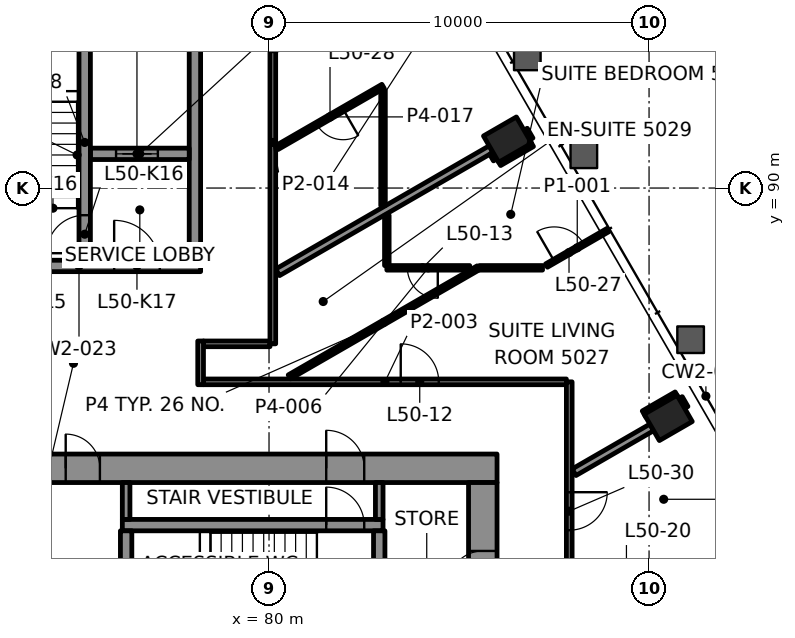
"""IFC4 building model, lengths in metres.
Left out: names, types, materials, properties, quantities, classifications, styles, units other than length and angle.
Written with IfcOpenShell. Run it as: python <this file> out.ifc"""

import sys

from ifc_helpers import new_model, si_unit, direction, frame, frame_2d, origin, origin_2d, place, context, subcontext, project, spatial, rectangle, hollow_rectangle, extrude, element, fill, save


model = new_model("IFC4")
c1 = context("Model", 3, precision=1e-05, world=origin(), true_north=direction((0.0, 1.0)))
c2 = subcontext(c1, "Body", "Model", "MODEL_VIEW")
j1 = project(units=[si_unit("LENGTHUNIT", "METRE"), si_unit("PLANEANGLEUNIT", "RADIAN")], contexts=[c1])
p1 = place(None, origin())
s1 = spatial("IfcSite", under=j1, at=p1, CompositionType="ELEMENT")
p2 = place(p1, origin())
s2 = spatial("IfcBuilding", under=s1, at=p2, CompositionType="ELEMENT")
p3 = place(p2, frame((0.0, 0.0, 214.3)))
s3 = spatial("IfcBuildingStorey", under=s2, at=p3, CompositionType="ELEMENT", Elevation=214.3)
for number, where, z_axis, x_axis in (
    (1, (90.504, 83.951, -0.0), (0.0, 0.0, 1.0), (-0.5, 0.866, 0.0)),
    (2, (86.276, 91.274, -0.0), (0.0, 0.0, 1.0), (-0.5, 0.866, 0.0)),
):
    element("IfcColumn", number, at=place(p3, frame(where, z_axis=z_axis, x_axis=x_axis)), inside=s3, PredefinedType="COLUMN", context=c2, shape_type="SweptSolid", body=[
        extrude(hollow_rectangle(XDim=0.8, YDim=1.0, WallThickness=0.05, at=origin_2d()), origin(), (0.0, 0.0, 1.0), 3.9),
    ])
p4 = place(p3, frame((64.0, 82.625, 0.0), z_axis=(0.0, 0.0, 1.0), x_axis=(1.0, 0.0, 0.0)))
e3 = element("IfcWall", 3, at=p4, inside=s3, PredefinedType="SHEAR", context=c2, shape_type="SweptSolid", body=[
    extrude(rectangle(XDim=22.0, YDim=0.75, at=frame_2d((11.0, 0.0))), origin(), (0.0, 0.0, 1.0), 3.7),
])
p5 = place(p4, frame((3.695, 0.0, 0.0)))
e4 = element("IfcOpeningElement", 4, at=p5, cuts=e3, PredefinedType="OPENING", context=c2, shape_type="SweptSolid", body=[
    extrude(rectangle(XDim=1.0, YDim=2.1, at=frame_2d((0.5, 1.05))), frame((0.0, 0.385, 0.0), z_axis=(0.0, -1.0, 0.0), x_axis=(1.0, 0.0, 0.0)), (0.0, 0.0, 1.0), 0.77),
])
p6 = place(p4, frame((17.505, 0.0, 0.0)))
e5 = element("IfcOpeningElement", 5, at=p6, cuts=e3, PredefinedType="OPENING", context=c2, shape_type="SweptSolid", body=[
    extrude(rectangle(XDim=1.0, YDim=2.1, at=frame_2d((0.5, 1.05))), frame((0.0, 0.385, 0.0), z_axis=(0.0, -1.0, 0.0), x_axis=(1.0, 0.0, 0.0)), (0.0, 0.0, 1.0), 0.77),
])
p7 = place(p4, frame((10.65, 0.0, 0.0)))
e6 = element("IfcOpeningElement", 6, at=p7, cuts=e3, PredefinedType="OPENING", context=c2, shape_type="SweptSolid", body=[
    extrude(rectangle(XDim=0.9, YDim=2.1, at=frame_2d((0.45, 1.05))), frame((0.0, 0.385, 0.0), z_axis=(0.0, -1.0, 0.0), x_axis=(1.0, 0.0, 0.0)), (0.0, 0.0, 1.0), 0.77),
])
p8 = place(p3, frame((85.625, 67.75, 0.0), z_axis=(0.0, 0.0, 1.0), x_axis=(0.0, 1.0, 0.0)))
e7 = element("IfcWall", 7, at=p8, inside=s3, PredefinedType="SHEAR", context=c2, shape_type="SweptSolid", body=[
    extrude(rectangle(XDim=14.5, YDim=0.75, at=frame_2d((7.25, 0.0))), origin(), (0.0, 0.0, 1.0), 3.7),
])
p9 = place(p8, frame((4.65, 0.0, 0.0)))
e8 = element("IfcOpeningElement", 8, at=p9, cuts=e7, PredefinedType="OPENING", context=c2, shape_type="SweptSolid", body=[
    extrude(rectangle(XDim=1.8, YDim=2.1, at=frame_2d((0.9, 1.05))), frame((0.0, 0.385, 0.0), z_axis=(0.0, -1.0, 0.0), x_axis=(1.0, 0.0, 0.0)), (0.0, 0.0, 1.0), 0.77),
])
p10 = place(p8, frame((11.8, 0.0, 0.0)))
e9 = element("IfcOpeningElement", 9, at=p10, cuts=e7, PredefinedType="OPENING", context=c2, shape_type="SweptSolid", body=[
    extrude(rectangle(XDim=0.9, YDim=2.1, at=frame_2d((0.45, 1.05))), frame((0.0, 0.385, 0.0), z_axis=(0.0, -1.0, 0.0), x_axis=(1.0, 0.0, 0.0)), (0.0, 0.0, 1.0), 0.77),
])
p11 = place(p3, frame((76.14, 81.13, 0.0), z_axis=(0.0, 0.0, 1.0), x_axis=(1.0, 0.0, 0.0)))
e10 = element("IfcWall", 10, at=p11, inside=s3, PredefinedType="SHEAR", context=c2, shape_type="SweptSolid", body=[
    extrude(rectangle(XDim=6.86, YDim=0.3, at=frame_2d((3.43, 0.0))), origin(), (0.0, 0.0, 1.0), 3.7),
])
p12 = place(p11, frame((5.365, 0.0, 0.0)))
e11 = element("IfcOpeningElement", 11, at=p12, cuts=e10, PredefinedType="OPENING", context=c2, shape_type="SweptSolid", body=[
    extrude(rectangle(XDim=1.0, YDim=2.1, at=frame_2d((0.5, 1.05))), frame((0.0, 0.16, 0.0), z_axis=(0.0, -1.0, 0.0), x_axis=(1.0, 0.0, 0.0)), (0.0, 0.0, 1.0), 0.32),
])
for number, where, z_axis, x_axis in (
    (12, (76.24, 77.9, 0.0), (0.0, 0.0, 1.0), (0.0, 1.0, 0.0)),
    (13, (82.9, 77.9, 0.0), (0.0, 0.0, 1.0), (0.0, 1.0, 0.0)),
):
    element("IfcWall", number, at=place(p3, frame(where, z_axis=z_axis, x_axis=x_axis)), inside=s3, PredefinedType="SHEAR", context=c2, shape_type="SweptSolid", body=[
        extrude(rectangle(XDim=3.08, YDim=0.3, at=frame_2d((1.54, 0.0))), origin(), (0.0, 0.0, 1.0), 3.7),
    ])
p13 = place(p3, frame((71.8, 87.95, 0.0), z_axis=(0.0, 0.0, 1.0), x_axis=(1.0, 0.0, 0.0)))
e14 = element("IfcWall", 14, at=p13, inside=s3, PredefinedType="SHEAR", context=c2, shape_type="SweptSolid", body=[
    extrude(rectangle(XDim=6.4, YDim=0.3, at=frame_2d((3.2, 0.0))), origin(), (0.0, 0.0, 1.0), 3.7),
])
p14 = place(p13, frame((1.325, 0.0, 0.0)))
e15 = element("IfcOpeningElement", 15, at=p14, cuts=e14, PredefinedType="OPENING", context=c2, shape_type="SweptSolid", body=[
    extrude(rectangle(XDim=1.0, YDim=2.1, at=frame_2d((0.5, 1.05))), frame((0.0, 0.16, 0.0), z_axis=(0.0, -1.0, 0.0), x_axis=(1.0, 0.0, 0.0)), (0.0, 0.0, 1.0), 0.32),
])
p15 = place(p13, frame((4.125, 0.0, 0.0)))
e16 = element("IfcOpeningElement", 16, at=p15, cuts=e14, PredefinedType="OPENING", context=c2, shape_type="SweptSolid", body=[
    extrude(rectangle(XDim=1.2, YDim=2.1, at=frame_2d((0.6, 1.05))), frame((0.0, 0.16, 0.0), z_axis=(0.0, -1.0, 0.0), x_axis=(1.0, 0.0, 0.0)), (0.0, 0.0, 1.0), 0.32),
])
p16 = place(p3, frame((78.05, 88.1, 0.0), z_axis=(0.0, 0.0, 1.0), x_axis=(0.0, 1.0, 0.0)))
e17 = element("IfcWall", 17, at=p16, inside=s3, PredefinedType="SHEAR", context=c2, shape_type="SweptSolid", body=[
    extrude(rectangle(XDim=6.2, YDim=0.3, at=frame_2d((3.1, 0.0))), origin(), (0.0, 0.0, 1.0), 3.7),
])
p17 = place(p3, frame((75.3, 90.9, 0.0), z_axis=(0.0, 0.0, 1.0), x_axis=(1.0, 0.0, 0.0)))
e18 = element("IfcWall", 18, at=p17, inside=s3, PredefinedType="SHEAR", context=c2, shape_type="SweptSolid", body=[
    extrude(rectangle(XDim=2.6, YDim=0.3, at=frame_2d((1.3, 0.0))), origin(), (0.0, 0.0, 1.0), 3.7),
])
p18 = place(p17, frame((0.675, 0.0, 0.0)))
e19 = element("IfcOpeningElement", 19, at=p18, cuts=e18, PredefinedType="OPENING", context=c2, shape_type="SweptSolid", body=[
    extrude(rectangle(XDim=1.1, YDim=2.1, at=frame_2d((0.55, 1.05))), frame((0.0, 0.16, 0.0), z_axis=(0.0, -1.0, 0.0), x_axis=(1.0, 0.0, 0.0)), (0.0, 0.0, 1.0), 0.32),
])
p19 = place(p3, frame((75.15, 88.1, 0.0), z_axis=(0.0, 0.0, 1.0), x_axis=(0.0, 1.0, 0.0)))
e20 = element("IfcWall", 20, at=p19, inside=s3, PredefinedType="SHEAR", context=c2, shape_type="SweptSolid", body=[
    extrude(rectangle(XDim=6.2, YDim=0.3, at=frame_2d((3.1, 0.0))), origin(), (0.0, 0.0, 1.0), 3.7),
])
p20 = place(p19, frame((0.185, 0.0, 0.0)))
e21 = element("IfcOpeningElement", 21, at=p20, cuts=e20, PredefinedType="OPENING", context=c2, shape_type="SweptSolid", body=[
    extrude(rectangle(XDim=1.0, YDim=2.1, at=frame_2d((0.5, 1.05))), frame((0.0, 0.16, 0.0), z_axis=(0.0, -1.0, 0.0), x_axis=(1.0, 0.0, 0.0)), (0.0, 0.0, 1.0), 0.32),
])
p21 = place(p3, frame((78.275, 84.9, 0.0), z_axis=(0.0, 0.0, 1.0), x_axis=(1.0, 0.0, 0.0)))
e22 = element("IfcWall", 22, at=p21, inside=s3, PredefinedType="PARTITIONING", context=c2, shape_type="SweptSolid", body=[
    extrude(rectangle(XDim=9.55, YDim=0.15, at=frame_2d((4.775, 0.0))), origin(), (0.0, 0.0, 1.0), 3.097),
])
p22 = place(p21, frame((5.191, 0.0, 0.0)))
e23 = element("IfcOpeningElement", 23, at=p22, cuts=e22, PredefinedType="OPENING", context=c2, shape_type="SweptSolid", body=[
    extrude(rectangle(XDim=1.0, YDim=2.1, at=frame_2d((0.5, 1.05))), frame((0.0, 0.085, 0.0), z_axis=(0.0, -1.0, 0.0), x_axis=(1.0, 0.0, 0.0)), (0.0, 0.0, 1.0), 0.17),
])
p23 = place(p3, frame((78.275, 85.9, 0.0), z_axis=(0.0, 0.0, 1.0), x_axis=(1.0, 0.0, 0.0)))
e24 = element("IfcWall", 24, at=p23, inside=s3, PredefinedType="PARTITIONING", context=c2, shape_type="SweptSolid", body=[
    extrude(rectangle(XDim=1.75, YDim=0.15, at=frame_2d((0.875, 0.0))), origin(), (0.0, 0.0, 1.0), 3.097),
])
p24 = place(p3, frame((85.281, 87.9, 0.0), z_axis=(0.0, 0.0, 1.0), x_axis=(-1.0, 0.0, 0.0)))
e25 = element("IfcWall", 25, at=p24, inside=s3, PredefinedType="PARTITIONING", context=c2, shape_type="SweptSolid", body=[
    extrude(rectangle(XDim=2.181, YDim=0.12, at=frame_2d((1.091, 0.0))), origin(), (0.0, 0.0, 1.0), 3.097),
])
p25 = place(p24, frame((0.841, 0.0, 0.0)))
e26 = element("IfcOpeningElement", 26, at=p25, cuts=e25, PredefinedType="OPENING", context=c2, shape_type="SweptSolid", body=[
    extrude(rectangle(XDim=0.8, YDim=2.1, at=frame_2d((0.4, 1.05))), frame((0.0, 0.07, 0.0), z_axis=(0.0, -1.0, 0.0), x_axis=(1.0, 0.0, 0.0)), (0.0, 0.0, 1.0), 0.14),
])
p26 = place(p3, frame((88.027, 82.521, 0.0), z_axis=(0.0, 0.0, 1.0), x_axis=(0.866032292145, 0.49998806882, 0.0)))
e27 = element("IfcWall", 27, at=p26, inside=s3, PredefinedType="PARTITIONING", context=c2, shape_type="SweptSolid", body=[
    extrude(rectangle(XDim=2.36, YDim=0.2, at=frame_2d((1.18, 0.0))), origin(), (0.0, 0.0, 1.0), 3.1),
])
p27 = place(p3, frame((89.871, 84.048, 0.0), z_axis=(0.0, 0.0, 1.0), x_axis=(0.866010750942, 0.50002537861, 0.0)))
e28 = element("IfcWall", 28, at=p27, inside=s3, PredefinedType="PARTITIONING", context=c2, shape_type="SweptSolid", body=[
    extrude(rectangle(XDim=1.0, YDim=0.2, at=frame_2d((0.5, 0.0))), origin(), (0.0, 0.0, 1.0), 3.022),
])
p28 = place(p3, frame((87.301, 87.96, 0.0), z_axis=(0.0, 0.0, 1.0), x_axis=(0.866000772924, 0.500042659475, 0.0)))
e29 = element("IfcWall", 29, at=p28, inside=s3, PredefinedType="PARTITIONING", context=c2, shape_type="SweptSolid", body=[
    extrude(rectangle(XDim=1.87, YDim=0.1, at=frame_2d((0.935, 0.0))), origin(), (0.0, 0.0, 1.0), 3.022),
])
p29 = place(p28, frame((0.235, 0.0, 0.0)))
e30 = element("IfcOpeningElement", 30, at=p29, cuts=e29, PredefinedType="OPENING", context=c2, shape_type="SweptSolid", body=[
    extrude(rectangle(XDim=0.9, YDim=2.1, at=frame_2d((0.45, 1.05))), frame((0.0, 0.06, 0.0), z_axis=(0.0, -1.0, 0.0), x_axis=(1.0, 0.0, 0.0)), (0.0, 0.0, 1.0), 0.12),
])
p30 = place(p3, frame((80.534, 85.03, 0.0), z_axis=(0.0, 0.0, 1.0), x_axis=(0.866014884179, 0.500018220049, 0.0)))
e31 = element("IfcWall", 31, at=p30, inside=s3, PredefinedType="PARTITIONING", context=c2, shape_type="SweptSolid", body=[
    extrude(rectangle(XDim=5.74, YDim=0.12, at=frame_2d((2.87, 0.0))), origin(), (0.0, 0.0, 1.0), 3.1),
])
p31 = place(p3, frame((86.043, 90.678, 0.0), z_axis=(0.0, 0.0, 1.0), x_axis=(0.866039090965, 0.499976292358, 0.0)))
e32 = element("IfcWall", 32, at=p31, inside=s3, PredefinedType="PARTITIONING", context=c2, shape_type="SweptSolid", body=[
    extrude(rectangle(XDim=0.999, YDim=0.2, at=frame_2d((0.5, 0.0))), origin(), (0.0, 0.0, 1.0), 3.022),
])
p32 = place(p3, frame((80.227, 87.782, 0.0), z_axis=(0.0, 0.0, 1.0), x_axis=(0.866028841934, 0.499994044904, 0.0)))
e33 = element("IfcWall", 33, at=p32, inside=s3, PredefinedType="PARTITIONING", context=c2, shape_type="SweptSolid", body=[
    extrude(rectangle(XDim=6.484, YDim=0.2, at=frame_2d((3.242, 0.0))), origin(), (0.0, 0.0, 1.0), 3.1),
])
p33 = place(p3, frame((83.0, 92.677, 0.0), z_axis=(0.0, 0.0, 1.0), x_axis=(-0.866029130051, -0.499993545862, 0.0)))
e34 = element("IfcWall", 34, at=p33, inside=s3, PredefinedType="PARTITIONING", context=c2, shape_type="SweptSolid", body=[
    extrude(rectangle(XDim=3.222, YDim=0.12, at=frame_2d((1.611, 0.0))), origin(), (0.0, 0.0, 1.0), 3.1),
])
p34 = place(p33, frame((1.211, 0.0, 0.0)))
e35 = element("IfcOpeningElement", 35, at=p34, cuts=e34, PredefinedType="OPENING", context=c2, shape_type="SweptSolid", body=[
    extrude(rectangle(XDim=0.8, YDim=2.1, at=frame_2d((0.4, 1.05))), frame((0.0, 0.07, 0.0), z_axis=(0.0, -1.0, 0.0), x_axis=(1.0, 0.0, 0.0)), (0.0, 0.0, 1.0), 0.14),
])
p35 = place(p3, frame((87.9, 84.9, 0.0), z_axis=(0.0, 0.0, 1.0), x_axis=(0.0, -1.0, 0.0)))
e36 = element("IfcWall", 36, at=p35, inside=s3, PredefinedType="PARTITIONING", context=c2, shape_type="SweptSolid", body=[
    extrude(rectangle(XDim=16.309, YDim=0.15, at=frame_2d((8.154, 0.0))), origin(), (0.0, 0.0, 1.0), 3.1),
])
p36 = place(p35, frame((2.904, 0.0, 0.0)))
e37 = element("IfcOpeningElement", 37, at=p36, cuts=e36, PredefinedType="OPENING", context=c2, shape_type="SweptSolid", body=[
    extrude(rectangle(XDim=1.0, YDim=2.1, at=frame_2d((0.5, 1.05))), frame((0.0, 0.085, 0.0), z_axis=(0.0, -1.0, 0.0), x_axis=(1.0, 0.0, 0.0)), (0.0, 0.0, 1.0), 0.17),
])
p37 = place(p35, frame((10.227, 0.0, 0.0)))
e38 = element("IfcOpeningElement", 38, at=p37, cuts=e36, PredefinedType="OPENING", context=c2, shape_type="SweptSolid", body=[
    extrude(rectangle(XDim=1.0, YDim=2.1, at=frame_2d((0.5, 1.05))), frame((0.0, 0.085, 0.0), z_axis=(0.0, -1.0, 0.0), x_axis=(1.0, 0.0, 0.0)), (0.0, 0.0, 1.0), 0.17),
])
p38 = place(p3, frame((83.1, 87.96, 0.0), z_axis=(0.0, 0.0, 1.0), x_axis=(0.0, 1.0, 0.0)))
e39 = element("IfcWall", 39, at=p38, inside=s3, PredefinedType="PARTITIONING", context=c2, shape_type="SweptSolid", body=[
    extrude(rectangle(XDim=1.325, YDim=0.12, at=frame_2d((0.663, 0.0))), origin(), (0.0, 0.0, 1.0), 3.1),
])
p39 = place(p3, frame((83.0, 89.538, 0.0), z_axis=(0.0, 0.0, 1.0), x_axis=(0.0, 1.0, 0.0)))
e40 = element("IfcWall", 40, at=p39, inside=s3, PredefinedType="PARTITIONING", context=c2, shape_type="SweptSolid", body=[
    extrude(rectangle(XDim=3.031, YDim=0.12, at=frame_2d((1.515, 0.0))), origin(), (0.0, 0.0, 1.0), 3.1),
])
p40 = place(p3, frame((80.1, 96.5, 0.0), z_axis=(0.0, 0.0, 1.0), x_axis=(0.0, -1.0, 0.0)))
e41 = element("IfcWall", 41, at=p40, inside=s3, PredefinedType="PARTITIONING", context=c2, shape_type="SweptSolid", body=[
    extrude(rectangle(XDim=10.6, YDim=0.15, at=frame_2d((5.3, 0.0))), origin(), (0.0, 0.0, 1.0), 3.097),
])
p41 = place(p40, frame((1.92, 0.0, 0.0)))
e42 = element("IfcOpeningElement", 42, at=p41, cuts=e41, PredefinedType="OPENING", context=c2, shape_type="SweptSolid", body=[
    extrude(rectangle(XDim=1.0, YDim=2.1, at=frame_2d((0.5, 1.05))), frame((0.0, 0.085, 0.0), z_axis=(0.0, -1.0, 0.0), x_axis=(1.0, 0.0, 0.0)), (0.0, 0.0, 1.0), 0.17),
])
p42 = place(p3, frame((78.2, 84.825, 0.0), z_axis=(0.0, 0.0, 1.0), x_axis=(0.0, 1.0, 0.0)))
e43 = element("IfcWall", 43, at=p42, inside=s3, PredefinedType="PARTITIONING", context=c2, shape_type="SweptSolid", body=[
    extrude(rectangle(XDim=1.15, YDim=0.15, at=frame_2d((0.575, 0.0))), origin(), (0.0, 0.0, 1.0), 3.1),
])
p43 = place(p3, frame((90.937, 84.201, 0.0), z_axis=(0.0, 0.0, 1.0), x_axis=(-0.500074377092, 0.865982457891, 0.0)))
e44 = element("IfcWall", 44, at=p43, inside=s3, PredefinedType="PARTITIONING", context=c2, shape_type="SweptSolid", body=[
    extrude(rectangle(XDim=0.3, YDim=0.2, at=frame_2d((0.15, 0.0))), origin(), (0.0, 0.0, 1.0), 3.1),
])
p44 = place(p3, frame((86.859, 91.264, 0.0), z_axis=(0.0, 0.0, 1.0), x_axis=(-0.500264001326, 0.865872928886, 0.0)))
e45 = element("IfcWall", 45, at=p44, inside=s3, PredefinedType="PARTITIONING", context=c2, shape_type="SweptSolid", body=[
    extrude(rectangle(XDim=0.299, YDim=0.2, at=frame_2d((0.149, 0.0))), origin(), (0.0, 0.0, 1.0), 3.1),
])
p45 = place(p3, frame((85.993, 90.764, 0.0), z_axis=(0.0, 0.0, 1.0), x_axis=(-0.500359323436, 0.865817848887, 0.0)))
e46 = element("IfcWall", 46, at=p45, inside=s3, PredefinedType="PARTITIONING", context=c2, shape_type="SweptSolid", body=[
    extrude(rectangle(XDim=0.199, YDim=0.2, at=frame_2d((0.1, 0.0))), origin(), (0.0, 0.0, 1.0), 3.1),
])
p46 = place(p3, frame((85.535, 87.9, 0.0), z_axis=(0.0, 0.0, 1.0), x_axis=(1.0, 0.0, 0.0)))
e47 = element("IfcWall", 47, at=p46, inside=s3, PredefinedType="PARTITIONING", context=c2, shape_type="SweptSolid", body=[
    extrude(rectangle(XDim=1.661, YDim=0.12, at=frame_2d((0.831, 0.0))), origin(), (0.0, 0.0, 1.0), 3.1),
])
for number, where, z_axis, x_axis in (
    (48, (76.24, 81.28, 0.0), (0.0, 0.0, 1.0), (0.0, 1.0, 0.0)),
    (49, (82.9, 81.28, 0.0), (0.0, 0.0, 1.0), (0.0, 1.0, 0.0)),
):
    element("IfcWall", number, at=place(p3, frame(where, z_axis=z_axis, x_axis=x_axis)), inside=s3, PredefinedType="PARTITIONING", context=c2, shape_type="SweptSolid", body=[
        extrude(rectangle(XDim=0.97, YDim=0.2, at=frame_2d((0.485, 0.0))), origin(), (0.0, 0.0, 1.0), 3.7),
    ])
p47 = place(p22, origin())
e50 = element("IfcDoor", 50, at=p47, inside=s3, OperationType="SINGLE_SWING_RIGHT", PredefinedType="DOOR", context=c2, shape_type="SweptSolid", body=[
    extrude(rectangle(XDim=1.0, YDim=2.1, at=frame_2d((0.5, 1.05))), frame((0.0, 0.025, 0.0), z_axis=(0.0, -1.0, 0.0), x_axis=(1.0, 0.0, 0.0)), (0.0, 0.0, 1.0), 0.05),
])
fill(e23, e50)
p48 = place(p25, origin())
e51 = element("IfcDoor", 51, at=p48, inside=s3, OperationType="SINGLE_SWING_LEFT", PredefinedType="DOOR", context=c2, shape_type="SweptSolid", body=[
    extrude(rectangle(XDim=0.8, YDim=2.1, at=frame_2d((0.4, 1.05))), frame((0.0, 0.025, 0.0), z_axis=(0.0, -1.0, 0.0), x_axis=(1.0, 0.0, 0.0)), (0.0, 0.0, 1.0), 0.05),
])
fill(e26, e51)
p49 = place(p29, origin())
e52 = element("IfcDoor", 52, at=p49, inside=s3, OperationType="SINGLE_SWING_LEFT", PredefinedType="DOOR", context=c2, shape_type="SweptSolid", body=[
    extrude(rectangle(XDim=0.9, YDim=2.1, at=frame_2d((0.45, 1.05))), frame((0.0, 0.025, 0.0), z_axis=(0.0, -1.0, 0.0), x_axis=(1.0, 0.0, 0.0)), (0.0, 0.0, 1.0), 0.05),
])
fill(e30, e52)
p50 = place(p34, origin())
e53 = element("IfcDoor", 53, at=p50, inside=s3, OperationType="SINGLE_SWING_LEFT", PredefinedType="DOOR", context=c2, shape_type="SweptSolid", body=[
    extrude(rectangle(XDim=0.8, YDim=2.1, at=frame_2d((0.4, 1.05))), frame((0.0, 0.025, 0.0), z_axis=(0.0, -1.0, 0.0), x_axis=(1.0, 0.0, 0.0)), (0.0, 0.0, 1.0), 0.05),
])
fill(e35, e53)
p51 = place(p36, origin())
e54 = element("IfcDoor", 54, at=p51, inside=s3, OperationType="SINGLE_SWING_LEFT", PredefinedType="DOOR", context=c2, shape_type="SweptSolid", body=[
    extrude(rectangle(XDim=1.0, YDim=2.1, at=frame_2d((0.5, 1.05))), frame((0.0, 0.025, 0.0), z_axis=(0.0, -1.0, 0.0), x_axis=(1.0, 0.0, 0.0)), (0.0, 0.0, 1.0), 0.05),
])
fill(e37, e54)
p52 = place(p41, origin())
e55 = element("IfcDoor", 55, at=p52, inside=s3, OperationType="SINGLE_SWING_RIGHT", PredefinedType="DOOR", context=c2, shape_type="SweptSolid", body=[
    extrude(rectangle(XDim=1.0, YDim=2.1, at=frame_2d((0.5, 1.05))), frame((0.0, 0.025, 0.0), z_axis=(0.0, -1.0, 0.0), x_axis=(1.0, 0.0, 0.0)), (0.0, 0.0, 1.0), 0.05),
])
fill(e42, e55)
p53 = place(p18, origin())
e56 = element("IfcDoor", 56, at=p53, inside=s3, OperationType="DOUBLE_DOOR_SLIDING", PredefinedType="DOOR", context=c2, shape_type="SweptSolid", body=[
    extrude(rectangle(XDim=1.1, YDim=2.1, at=frame_2d((0.55, 1.05))), frame((0.0, 0.025, 0.0), z_axis=(0.0, -1.0, 0.0), x_axis=(1.0, 0.0, 0.0)), (0.0, 0.0, 1.0), 0.05),
])
fill(e19, e56)
p54 = place(p12, origin())
e57 = element("IfcDoor", 57, at=p54, inside=s3, OperationType="SINGLE_SWING_RIGHT", PredefinedType="DOOR", context=c2, shape_type="SweptSolid", body=[
    extrude(rectangle(XDim=1.0, YDim=2.1, at=frame_2d((0.5, 1.05))), frame((0.0, 0.025, 0.0), z_axis=(0.0, -1.0, 0.0), x_axis=(1.0, 0.0, 0.0)), (0.0, 0.0, 1.0), 0.05),
])
fill(e11, e57)
p55 = place(p6, origin())
e58 = element("IfcDoor", 58, at=p55, inside=s3, OperationType="SINGLE_SWING_LEFT", PredefinedType="DOOR", context=c2, shape_type="SweptSolid", body=[
    extrude(rectangle(XDim=1.0, YDim=2.1, at=frame_2d((0.5, 1.05))), frame((0.0, 0.095, 0.0), z_axis=(0.0, -1.0, 0.0), x_axis=(1.0, 0.0, 0.0)), (0.0, 0.0, 1.0), 0.19),
])
fill(e5, e58)
p56 = place(p20, origin())
e59 = element("IfcDoor", 59, at=p56, inside=s3, OperationType="SINGLE_SWING_LEFT", PredefinedType="DOOR", context=c2, shape_type="SweptSolid", body=[
    extrude(rectangle(XDim=1.0, YDim=2.1, at=frame_2d((0.5, 1.05))), frame((0.0, 0.025, 0.0), z_axis=(0.0, -1.0, 0.0), x_axis=(1.0, 0.0, 0.0)), (0.0, 0.0, 1.0), 0.05),
])
fill(e21, e59)
p57 = place(p15, origin())
e60 = element("IfcDoor", 60, at=p57, inside=s3, OperationType="SINGLE_SWING_RIGHT", PredefinedType="DOOR", context=c2, shape_type="SweptSolid", body=[
    extrude(rectangle(XDim=1.2, YDim=2.1, at=frame_2d((0.6, 1.05))), frame((0.0, 0.025, 0.0), z_axis=(0.0, -1.0, 0.0), x_axis=(1.0, 0.0, 0.0)), (0.0, 0.0, 1.0), 0.05),
])
fill(e16, e60)
p58 = place(p7, origin())
e61 = element("IfcDoor", 61, at=p58, inside=s3, OperationType="SINGLE_SWING_LEFT", PredefinedType="DOOR", context=c2, shape_type="SweptSolid", body=[
    extrude(rectangle(XDim=0.9, YDim=2.1, at=frame_2d((0.45, 1.05))), frame((0.0, 0.095, 0.0), z_axis=(0.0, -1.0, 0.0), x_axis=(1.0, 0.0, 0.0)), (0.0, 0.0, 1.0), 0.19),
])
fill(e6, e61)
p59 = place(p10, origin())
e62 = element("IfcDoor", 62, at=p59, inside=s3, OperationType="SINGLE_SWING_RIGHT", PredefinedType="DOOR", context=c2, shape_type="SweptSolid", body=[
    extrude(rectangle(XDim=0.9, YDim=2.1, at=frame_2d((0.45, 1.05))), frame((0.0, 0.095, 0.0), z_axis=(0.0, -1.0, 0.0), x_axis=(1.0, 0.0, 0.0)), (0.0, 0.0, 1.0), 0.19),
])
fill(e9, e62)
save(model, sys.argv[1])
